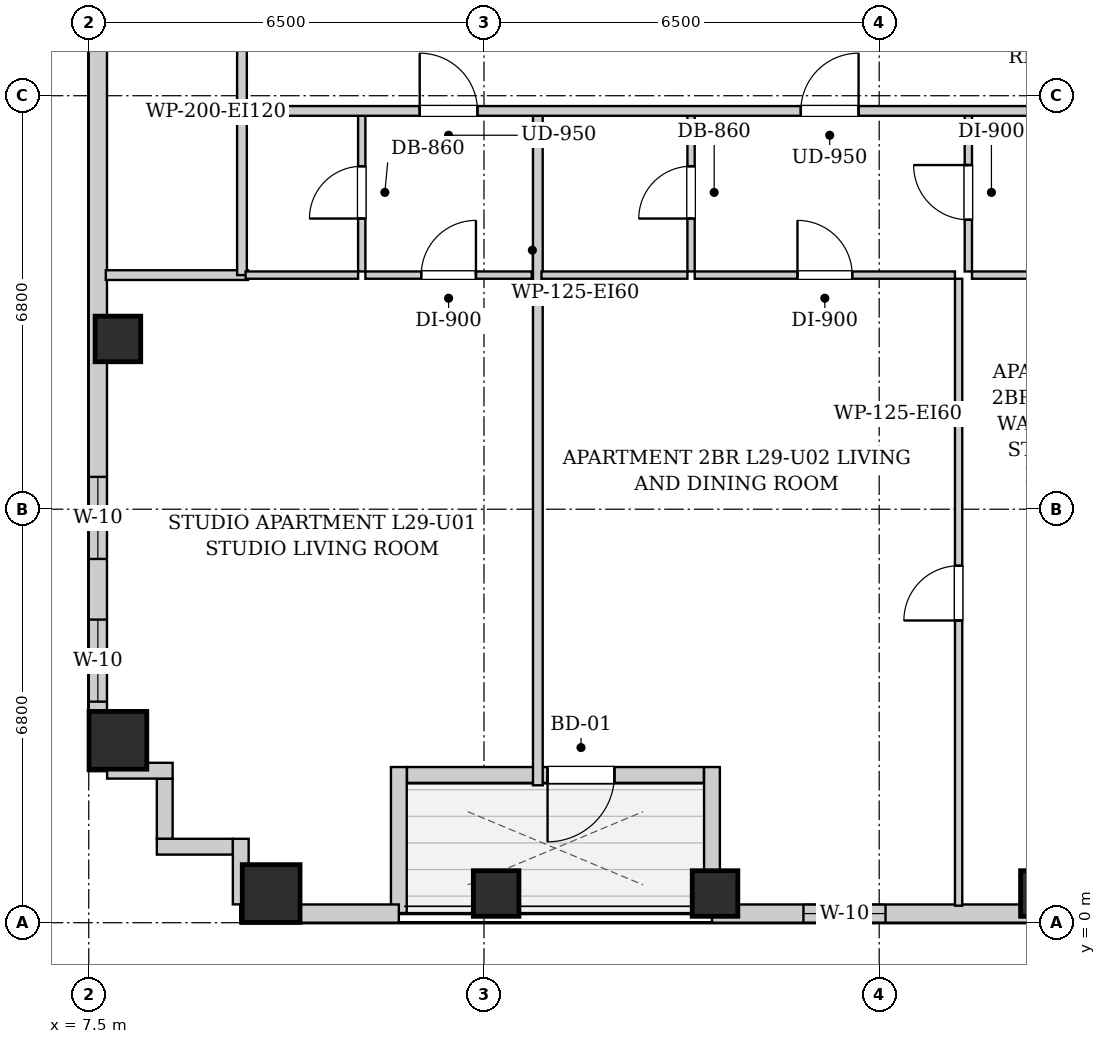
"""IFC4 building model, lengths in metres.
Left out: names, types, materials, properties, quantities, classifications, styles, units other than length and angle.
Written with IfcOpenShell. Run it as: python <this file> out.ifc"""

import sys

from ifc_helpers import new_model, si_unit, direction, frame, frame_2d, origin, origin_2d, place, context, subcontext, project, spatial, rectangle, extrude, element, fill, save


model = new_model("IFC4")
c1 = context("Model", 3, precision=1e-05, world=origin(), true_north=direction((0.0, 1.0)))
c2 = subcontext(c1, "Body", "Model", "MODEL_VIEW")
j1 = project(units=[si_unit("LENGTHUNIT", "METRE"), si_unit("PLANEANGLEUNIT", "RADIAN")], contexts=[c1])
p1 = place(None, origin())
s1 = spatial("IfcSite", under=j1, at=p1, CompositionType="ELEMENT")
p2 = place(p1, origin())
s2 = spatial("IfcBuilding", under=s1, at=p2, CompositionType="ELEMENT")
p3 = place(p2, frame((0.0, 0.0, 103.9)))
s3 = spatial("IfcBuildingStorey", under=s2, at=p3, CompositionType="ELEMENT", Elevation=103.9)
p4 = place(p3, frame((10.5, 0.48, 0.0), z_axis=(0.0, 0.0, 1.0), x_axis=(1.0, 0.0, 0.0)))
e1 = element("IfcColumn", 1, at=p4, inside=s3, PredefinedType="COLUMN", context=c2, shape_type="SweptSolid", body=[
    extrude(rectangle(XDim=0.95, YDim=0.95, at=origin_2d()), origin(), (0.0, 0.0, 1.0), 3.2),
])
for number, where, z_axis, x_axis in (
    (2, (14.2, 0.48, 0.0), (0.0, 0.0, 1.0), (1.0, 0.0, 0.0)),
    (3, (17.8, 0.48, 0.0), (0.0, 0.0, 1.0), (1.0, 0.0, 0.0)),
    (4, (23.2, 0.48, 0.0), (0.0, 0.0, 1.0), (1.0, 0.0, 0.0)),
):
    element("IfcColumn", number, at=place(p3, frame(where, z_axis=z_axis, x_axis=x_axis)), inside=s3, PredefinedType="COLUMN", context=c2, shape_type="SweptSolid", body=[
        extrude(rectangle(XDim=0.75, YDim=0.75, at=origin_2d()), origin(), (0.0, 0.0, 1.0), 3.2),
    ])
p5 = place(p3, frame((7.98, 3.0, 0.0), z_axis=(0.0, 0.0, 1.0), x_axis=(1.0, 0.0, 0.0)))
e5 = element("IfcColumn", 5, at=p5, inside=s3, PredefinedType="COLUMN", context=c2, shape_type="SweptSolid", body=[
    extrude(rectangle(XDim=0.95, YDim=0.95, at=origin_2d()), origin(), (0.0, 0.0, 1.0), 3.2),
])
p6 = place(p3, frame((7.98, 9.6, 0.0), z_axis=(0.0, 0.0, 1.0), x_axis=(1.0, 0.0, 0.0)))
e6 = element("IfcColumn", 6, at=p6, inside=s3, PredefinedType="COLUMN", context=c2, shape_type="SweptSolid", body=[
    extrude(rectangle(XDim=0.75, YDim=0.75, at=origin_2d()), origin(), (0.0, 0.0, 1.0), 3.2),
])
p7 = place(p3, frame((40.9, 0.15, 0.0), z_axis=(0.0, 0.0, 1.0), x_axis=(-1.0, 0.0, 0.0)))
e7 = element("IfcWall", 7, at=p7, inside=s3, PredefinedType="SOLIDWALL", context=c2, shape_type="SweptSolid", body=[
    extrude(rectangle(XDim=23.15, YDim=0.3, at=frame_2d((11.575, 0.0))), origin(), (0.0, 0.0, 1.0), 2.94),
])
p8 = place(p7, frame((20.296, 0.0, 0.55)))
e8 = element("IfcOpeningElement", 8, at=p8, cuts=e7, PredefinedType="OPENING", context=c2, shape_type="SweptSolid", body=[
    extrude(rectangle(XDim=1.35, YDim=1.2, at=frame_2d((0.675, 0.6))), frame((0.0, 0.16, 0.0), z_axis=(0.0, -1.0, 0.0), x_axis=(1.0, 0.0, 0.0)), (0.0, 0.0, 1.0), 0.32),
])
p9 = place(p7, frame((12.55, 0.0, 0.55)))
e9 = element("IfcOpeningElement", 9, at=p9, cuts=e7, PredefinedType="OPENING", context=c2, shape_type="SweptSolid", body=[
    extrude(rectangle(XDim=0.85, YDim=1.2, at=frame_2d((0.425, 0.6))), frame((0.0, 0.16, 0.0), z_axis=(0.0, -1.0, 0.0), x_axis=(1.0, 0.0, 0.0)), (0.0, 0.0, 1.0), 0.32),
])
p10 = place(p7, frame((9.622, 0.0, 0.55)))
e10 = element("IfcOpeningElement", 10, at=p10, cuts=e7, PredefinedType="OPENING", context=c2, shape_type="SweptSolid", body=[
    extrude(rectangle(XDim=1.35, YDim=1.2, at=frame_2d((0.675, 0.6))), frame((0.0, 0.16, 0.0), z_axis=(0.0, -1.0, 0.0), x_axis=(1.0, 0.0, 0.0)), (0.0, 0.0, 1.0), 0.32),
])
p11 = place(p7, frame((5.815, 0.0, 0.55)))
e11 = element("IfcOpeningElement", 11, at=p11, cuts=e7, PredefinedType="OPENING", context=c2, shape_type="SweptSolid", body=[
    extrude(rectangle(XDim=1.35, YDim=1.2, at=frame_2d((0.675, 0.6))), frame((0.0, 0.16, 0.0), z_axis=(0.0, -1.0, 0.0), x_axis=(1.0, 0.0, 0.0)), (0.0, 0.0, 1.0), 0.32),
])
p12 = place(p7, frame((2.106, 0.0, 0.55)))
e12 = element("IfcOpeningElement", 12, at=p12, cuts=e7, PredefinedType="OPENING", context=c2, shape_type="SweptSolid", body=[
    extrude(rectangle(XDim=1.35, YDim=1.2, at=frame_2d((0.675, 0.6))), frame((0.0, 0.16, 0.0), z_axis=(0.0, -1.0, 0.0), x_axis=(1.0, 0.0, 0.0)), (0.0, 0.0, 1.0), 0.32),
])
p13 = place(p3, frame((17.75, 0.16, 0.0), z_axis=(0.0, 0.0, 1.0), x_axis=(0.0, 1.0, 0.0)))
e13 = element("IfcWall", 13, at=p13, inside=s3, PredefinedType="SOLIDWALL", context=c2, shape_type="SweptSolid", body=[
    extrude(rectangle(XDim=2.4, YDim=0.26, at=frame_2d((1.2, 0.0))), origin(), (0.0, 0.0, 1.0), 2.313),
])
p14 = place(p3, frame((17.616, 2.43, 0.0), z_axis=(0.0, 0.0, 1.0), x_axis=(-1.0, 0.0, 0.0)))
e14 = element("IfcWall", 14, at=p14, inside=s3, PredefinedType="SOLIDWALL", context=c2, shape_type="SweptSolid", body=[
    extrude(rectangle(XDim=4.882, YDim=0.26, at=frame_2d((2.441, 0.0))), origin(), (0.0, 0.0, 1.0), 2.94),
])
p15 = place(p14, frame((1.47, 0.0, 0.0)))
e15 = element("IfcOpeningElement", 15, at=p15, cuts=e14, PredefinedType="OPENING", context=c2, shape_type="SweptSolid", body=[
    extrude(rectangle(XDim=1.1, YDim=2.0, at=frame_2d((0.55, 1.0))), frame((0.0, 0.14, 0.0), z_axis=(0.0, -1.0, 0.0), x_axis=(1.0, 0.0, 0.0)), (0.0, 0.0, 1.0), 0.28),
])
p16 = place(p3, frame((12.6, 2.56, 0.0), z_axis=(0.0, 0.0, 1.0), x_axis=(0.0, -1.0, 0.0)))
e16 = element("IfcWall", 16, at=p16, inside=s3, PredefinedType="SOLIDWALL", context=c2, shape_type="SweptSolid", body=[
    extrude(rectangle(XDim=2.4, YDim=0.26, at=frame_2d((1.2, 0.0))), origin(), (0.0, 0.0, 1.0), 2.94),
])
p17 = place(p3, frame((12.6, 0.15, 0.0), z_axis=(0.0, 0.0, 1.0), x_axis=(-1.0, 0.0, 0.0)))
e17 = element("IfcWall", 17, at=p17, inside=s3, PredefinedType="SOLIDWALL", context=c2, shape_type="SweptSolid", body=[
    extrude(rectangle(XDim=2.6, YDim=0.3, at=frame_2d((1.3, 0.0))), origin(), (0.0, 0.0, 1.0), 2.94),
])
p18 = place(p3, frame((7.65, 2.5, 0.0), z_axis=(0.0, 0.0, 1.0), x_axis=(0.0, 1.0, 0.0)))
e18 = element("IfcWall", 18, at=p18, inside=s3, PredefinedType="SOLIDWALL", context=c2, shape_type="SweptSolid", body=[
    extrude(rectangle(XDim=12.7, YDim=0.3, at=frame_2d((6.35, 0.0))), origin(), (0.0, 0.0, 1.0), 2.94),
])
p19 = place(p18, frame((3.482, 0.0, 0.55)))
e19 = element("IfcOpeningElement", 19, at=p19, cuts=e18, PredefinedType="OPENING", context=c2, shape_type="SweptSolid", body=[
    extrude(rectangle(XDim=1.35, YDim=1.2, at=frame_2d((0.675, 0.6))), frame((0.0, 0.16, 0.0), z_axis=(0.0, -1.0, 0.0), x_axis=(1.0, 0.0, 0.0)), (0.0, 0.0, 1.0), 0.32),
])
p20 = place(p18, frame((1.135, 0.0, 0.55)))
e20 = element("IfcOpeningElement", 20, at=p20, cuts=e18, PredefinedType="OPENING", context=c2, shape_type="SweptSolid", body=[
    extrude(rectangle(XDim=1.35, YDim=1.2, at=frame_2d((0.675, 0.6))), frame((0.0, 0.16, 0.0), z_axis=(0.0, -1.0, 0.0), x_axis=(1.0, 0.0, 0.0)), (0.0, 0.0, 1.0), 0.32),
])
p21 = place(p3, frame((10.0, 0.302, 0.0), z_axis=(0.0, 0.0, 1.0), x_axis=(0.0, 1.0, 0.0)))
e21 = element("IfcWall", 21, at=p21, inside=s3, PredefinedType="SOLIDWALL", context=c2, shape_type="SweptSolid", body=[
    extrude(rectangle(XDim=1.078, YDim=0.26, at=frame_2d((0.539, 0.0))), origin(), (0.0, 0.0, 1.0), 2.94),
])
p22 = place(p3, frame((9.868, 1.25, 0.0), z_axis=(0.0, 0.0, 1.0), x_axis=(-1.0, 0.0, 0.0)))
e22 = element("IfcWall", 22, at=p22, inside=s3, PredefinedType="SOLIDWALL", context=c2, shape_type="SweptSolid", body=[
    extrude(rectangle(XDim=1.248, YDim=0.26, at=frame_2d((0.624, 0.0))), origin(), (0.0, 0.0, 1.0), 2.94),
])
p23 = place(p3, frame((8.75, 1.382, 0.0), z_axis=(0.0, 0.0, 1.0), x_axis=(0.0, 1.0, 0.0)))
e23 = element("IfcWall", 23, at=p23, inside=s3, PredefinedType="SOLIDWALL", context=c2, shape_type="SweptSolid", body=[
    extrude(rectangle(XDim=0.986, YDim=0.26, at=frame_2d((0.493, 0.0))), origin(), (0.0, 0.0, 1.0), 2.94),
])
p24 = place(p3, frame((8.88, 2.5, 0.0), z_axis=(0.0, 0.0, 1.0), x_axis=(-1.0, 0.0, 0.0)))
e24 = element("IfcWall", 24, at=p24, inside=s3, PredefinedType="SOLIDWALL", context=c2, shape_type="SweptSolid", body=[
    extrude(rectangle(XDim=1.078, YDim=0.26, at=frame_2d((0.539, 0.0))), origin(), (0.0, 0.0, 1.0), 2.94),
])
p25 = place(p3, frame((10.02, 13.35, 0.0), z_axis=(0.0, 0.0, 1.0), x_axis=(0.0, 1.0, 0.0)))
e25 = element("IfcWall", 25, at=p25, inside=s3, PredefinedType="PARTITIONING", context=c2, shape_type="SweptSolid", body=[
    extrude(rectangle(XDim=1.74, YDim=0.16, at=frame_2d((0.87, 0.0))), origin(), (0.0, 0.0, 1.0), 2.94),
])
p26 = place(p3, frame((7.78, 10.65, 0.0), z_axis=(0.0, 0.0, 1.0), x_axis=(1.0, 0.0, 0.0)))
e26 = element("IfcWall", 26, at=p26, inside=s3, PredefinedType="PARTITIONING", context=c2, shape_type="SweptSolid", body=[
    extrude(rectangle(XDim=2.34, YDim=0.16, at=frame_2d((1.17, 0.0))), origin(), (0.0, 0.0, 1.0), 2.94),
])
p27 = place(p3, frame((10.02, 10.65, 0.0), z_axis=(0.0, 0.0, 1.0), x_axis=(0.0, 1.0, 0.0)))
e27 = element("IfcWall", 27, at=p27, inside=s3, PredefinedType="PARTITIONING", context=c2, shape_type="SweptSolid", body=[
    extrude(rectangle(XDim=2.66, YDim=0.16, at=frame_2d((1.33, 0.0))), origin(), (0.0, 0.0, 1.0), 2.94),
])
p28 = place(p3, frame((11.99, 10.71, 0.0), z_axis=(0.0, 0.0, 1.0), x_axis=(0.0, 1.0, 0.0)))
e28 = element("IfcWall", 28, at=p28, inside=s3, PredefinedType="PARTITIONING", context=c2, shape_type="SweptSolid", body=[
    extrude(rectangle(XDim=2.6, YDim=0.12, at=frame_2d((1.3, 0.0))), origin(), (0.0, 0.0, 1.0), 2.94),
])
p29 = place(p28, frame((0.87, 0.0, 0.0)))
e29 = element("IfcOpeningElement", 29, at=p29, cuts=e28, PredefinedType="OPENING", context=c2, shape_type="SweptSolid", body=[
    extrude(rectangle(XDim=0.86, YDim=2.05, at=frame_2d((0.43, 1.025))), frame((0.0, 0.07, 0.0), z_axis=(0.0, -1.0, 0.0), x_axis=(1.0, 0.0, 0.0)), (0.0, 0.0, 1.0), 0.14),
])
p30 = place(p3, frame((10.08, 10.65, 0.0), z_axis=(0.0, 0.0, 1.0), x_axis=(1.0, 0.0, 0.0)))
e30 = element("IfcWall", 30, at=p30, inside=s3, PredefinedType="PARTITIONING", context=c2, shape_type="SweptSolid", body=[
    extrude(rectangle(XDim=1.85, YDim=0.12, at=frame_2d((0.925, 0.0))), origin(), (0.0, 0.0, 1.0), 2.94),
])
p31 = place(p3, frame((12.05, 10.65, 0.0), z_axis=(0.0, 0.0, 1.0), x_axis=(1.0, 0.0, 0.0)))
e31 = element("IfcWall", 31, at=p31, inside=s3, PredefinedType="PARTITIONING", context=c2, shape_type="SweptSolid", body=[
    extrude(rectangle(XDim=2.736, YDim=0.12, at=frame_2d((1.368, 0.0))), origin(), (0.0, 0.0, 1.0), 2.94),
])
p32 = place(p31, frame((0.918, 0.0, 0.0)))
e32 = element("IfcOpeningElement", 32, at=p32, cuts=e31, PredefinedType="OPENING", context=c2, shape_type="SweptSolid", body=[
    extrude(rectangle(XDim=0.9, YDim=2.05, at=frame_2d((0.45, 1.025))), frame((0.0, 0.07, 0.0), z_axis=(0.0, -1.0, 0.0), x_axis=(1.0, 0.0, 0.0)), (0.0, 0.0, 1.0), 0.14),
])
p33 = place(p3, frame((14.886, 2.26, 0.0), z_axis=(0.0, 0.0, 1.0), x_axis=(0.0, 1.0, 0.0)))
e33 = element("IfcWall", 33, at=p33, inside=s3, PredefinedType="PARTITIONING", context=c2, shape_type="SweptSolid", body=[
    extrude(rectangle(XDim=11.05, YDim=0.16, at=frame_2d((5.525, 0.0))), origin(), (0.0, 0.0, 1.0), 2.94),
])
p34 = place(p3, frame((17.406, 10.71, 0.0), z_axis=(0.0, 0.0, 1.0), x_axis=(0.0, 1.0, 0.0)))
e34 = element("IfcWall", 34, at=p34, inside=s3, PredefinedType="PARTITIONING", context=c2, shape_type="SweptSolid", body=[
    extrude(rectangle(XDim=2.6, YDim=0.12, at=frame_2d((1.3, 0.0))), origin(), (0.0, 0.0, 1.0), 2.94),
])
p35 = place(p34, frame((0.87, 0.0, 0.0)))
e35 = element("IfcOpeningElement", 35, at=p35, cuts=e34, PredefinedType="OPENING", context=c2, shape_type="SweptSolid", body=[
    extrude(rectangle(XDim=0.86, YDim=2.05, at=frame_2d((0.43, 1.025))), frame((0.0, 0.07, 0.0), z_axis=(0.0, -1.0, 0.0), x_axis=(1.0, 0.0, 0.0)), (0.0, 0.0, 1.0), 0.14),
])
p36 = place(p3, frame((14.946, 10.65, 0.0), z_axis=(0.0, 0.0, 1.0), x_axis=(1.0, 0.0, 0.0)))
e36 = element("IfcWall", 36, at=p36, inside=s3, PredefinedType="PARTITIONING", context=c2, shape_type="SweptSolid", body=[
    extrude(rectangle(XDim=2.4, YDim=0.12, at=frame_2d((1.2, 0.0))), origin(), (0.0, 0.0, 1.0), 2.94),
])
p37 = place(p3, frame((21.966, 10.71, 0.0), z_axis=(0.0, 0.0, 1.0), x_axis=(0.0, 1.0, 0.0)))
e37 = element("IfcWall", 37, at=p37, inside=s3, PredefinedType="PARTITIONING", context=c2, shape_type="SweptSolid", body=[
    extrude(rectangle(XDim=2.6, YDim=0.12, at=frame_2d((1.3, 0.0))), origin(), (0.0, 0.0, 1.0), 2.94),
])
p38 = place(p37, frame((0.85, 0.0, 0.0)))
e38 = element("IfcOpeningElement", 38, at=p38, cuts=e37, PredefinedType="OPENING", context=c2, shape_type="SweptSolid", body=[
    extrude(rectangle(XDim=0.9, YDim=2.05, at=frame_2d((0.45, 1.025))), frame((0.0, 0.07, 0.0), z_axis=(0.0, -1.0, 0.0), x_axis=(1.0, 0.0, 0.0)), (0.0, 0.0, 1.0), 0.14),
])
p39 = place(p3, frame((17.466, 10.65, 0.0), z_axis=(0.0, 0.0, 1.0), x_axis=(1.0, 0.0, 0.0)))
e39 = element("IfcWall", 39, at=p39, inside=s3, PredefinedType="PARTITIONING", context=c2, shape_type="SweptSolid", body=[
    extrude(rectangle(XDim=4.28, YDim=0.12, at=frame_2d((2.14, 0.0))), origin(), (0.0, 0.0, 1.0), 2.94),
])
p40 = place(p39, frame((1.69, 0.0, 0.0)))
e40 = element("IfcOpeningElement", 40, at=p40, cuts=e39, PredefinedType="OPENING", context=c2, shape_type="SweptSolid", body=[
    extrude(rectangle(XDim=0.9, YDim=2.05, at=frame_2d((0.45, 1.025))), frame((0.0, 0.07, 0.0), z_axis=(0.0, -1.0, 0.0), x_axis=(1.0, 0.0, 0.0)), (0.0, 0.0, 1.0), 0.14),
])
p41 = place(p3, frame((22.026, 10.65, 0.0), z_axis=(0.0, 0.0, 1.0), x_axis=(1.0, 0.0, 0.0)))
e41 = element("IfcWall", 41, at=p41, inside=s3, PredefinedType="PARTITIONING", context=c2, shape_type="SweptSolid", body=[
    extrude(rectangle(XDim=2.905, YDim=0.12, at=frame_2d((1.453, 0.0))), origin(), (0.0, 0.0, 1.0), 2.94),
])
p42 = place(p41, frame((1.003, 0.0, 0.0)))
e42 = element("IfcOpeningElement", 42, at=p42, cuts=e41, PredefinedType="OPENING", context=c2, shape_type="SweptSolid", body=[
    extrude(rectangle(XDim=0.9, YDim=2.05, at=frame_2d((0.45, 1.025))), frame((0.0, 0.07, 0.0), z_axis=(0.0, -1.0, 0.0), x_axis=(1.0, 0.0, 0.0)), (0.0, 0.0, 1.0), 0.14),
])
p43 = place(p3, frame((21.806, 0.28, 0.0), z_axis=(0.0, 0.0, 1.0), x_axis=(0.0, 1.0, 0.0)))
e43 = element("IfcWall", 43, at=p43, inside=s3, PredefinedType="PARTITIONING", context=c2, shape_type="SweptSolid", body=[
    extrude(rectangle(XDim=10.31, YDim=0.12, at=frame_2d((5.155, 0.0))), origin(), (0.0, 0.0, 1.0), 2.94),
])
p44 = place(p43, frame((4.69, 0.0, 0.0)))
e44 = element("IfcOpeningElement", 44, at=p44, cuts=e43, PredefinedType="OPENING", context=c2, shape_type="SweptSolid", body=[
    extrude(rectangle(XDim=0.9, YDim=2.05, at=frame_2d((0.45, 1.025))), frame((0.0, 0.07, 0.0), z_axis=(0.0, -1.0, 0.0), x_axis=(1.0, 0.0, 0.0)), (0.0, 0.0, 1.0), 0.14),
])
p45 = place(p3, frame((10.05, 13.35, 0.0), z_axis=(0.0, 0.0, 1.0), x_axis=(1.0, 0.0, 0.0)))
e45 = element("IfcWall", 45, at=p45, inside=s3, PredefinedType="PARTITIONING", context=c2, shape_type="SweptSolid", body=[
    extrude(rectangle(XDim=30.8, YDim=0.16, at=frame_2d((15.4, 0.0))), origin(), (0.0, 0.0, 1.0), 2.94),
])
p46 = place(p45, frame((2.893, 0.0, 0.0)))
e46 = element("IfcOpeningElement", 46, at=p46, cuts=e45, PredefinedType="OPENING", context=c2, shape_type="SweptSolid", body=[
    extrude(rectangle(XDim=0.95, YDim=2.1, at=frame_2d((0.475, 1.05))), frame((0.0, 0.09, 0.0), z_axis=(0.0, -1.0, 0.0), x_axis=(1.0, 0.0, 0.0)), (0.0, 0.0, 1.0), 0.18),
])
p47 = place(p45, frame((9.161, 0.0, 0.0)))
e47 = element("IfcOpeningElement", 47, at=p47, cuts=e45, PredefinedType="OPENING", context=c2, shape_type="SweptSolid", body=[
    extrude(rectangle(XDim=0.95, YDim=2.1, at=frame_2d((0.475, 1.05))), frame((0.0, 0.09, 0.0), z_axis=(0.0, -1.0, 0.0), x_axis=(1.0, 0.0, 0.0)), (0.0, 0.0, 1.0), 0.18),
])
p48 = place(p45, frame((26.306, 0.0, 0.0)))
e48 = element("IfcOpeningElement", 48, at=p48, cuts=e45, PredefinedType="OPENING", context=c2, shape_type="SweptSolid", body=[
    extrude(rectangle(XDim=0.95, YDim=2.1, at=frame_2d((0.475, 1.05))), frame((0.0, 0.09, 0.0), z_axis=(0.0, -1.0, 0.0), x_axis=(1.0, 0.0, 0.0)), (0.0, 0.0, 1.0), 0.18),
])
p49 = place(p29, origin())
e49 = element("IfcDoor", 49, at=p49, inside=s3, OperationType="SINGLE_SWING_LEFT", PredefinedType="DOOR", context=c2, shape_type="SweptSolid", body=[
    extrude(rectangle(XDim=0.86, YDim=2.05, at=frame_2d((0.43, 1.025))), frame((0.0, 0.025, 0.0), z_axis=(0.0, -1.0, 0.0), x_axis=(1.0, 0.0, 0.0)), (0.0, 0.0, 1.0), 0.05),
])
fill(e29, e49)
p50 = place(p32, origin())
e50 = element("IfcDoor", 50, at=p50, inside=s3, OperationType="SINGLE_SWING_RIGHT", PredefinedType="DOOR", context=c2, shape_type="SweptSolid", body=[
    extrude(rectangle(XDim=0.9, YDim=2.05, at=frame_2d((0.45, 1.025))), frame((0.0, 0.025, 0.0), z_axis=(0.0, -1.0, 0.0), x_axis=(1.0, 0.0, 0.0)), (0.0, 0.0, 1.0), 0.05),
])
fill(e32, e50)
p51 = place(p35, origin())
e51 = element("IfcDoor", 51, at=p51, inside=s3, OperationType="SINGLE_SWING_LEFT", PredefinedType="DOOR", context=c2, shape_type="SweptSolid", body=[
    extrude(rectangle(XDim=0.86, YDim=2.05, at=frame_2d((0.43, 1.025))), frame((0.0, 0.025, 0.0), z_axis=(0.0, -1.0, 0.0), x_axis=(1.0, 0.0, 0.0)), (0.0, 0.0, 1.0), 0.05),
])
fill(e35, e51)
p52 = place(p38, origin())
e52 = element("IfcDoor", 52, at=p52, inside=s3, OperationType="SINGLE_SWING_RIGHT", PredefinedType="DOOR", context=c2, shape_type="SweptSolid", body=[
    extrude(rectangle(XDim=0.9, YDim=2.05, at=frame_2d((0.45, 1.025))), frame((0.0, 0.025, 0.0), z_axis=(0.0, -1.0, 0.0), x_axis=(1.0, 0.0, 0.0)), (0.0, 0.0, 1.0), 0.05),
])
fill(e38, e52)
p53 = place(p40, origin())
e53 = element("IfcDoor", 53, at=p53, inside=s3, OperationType="SINGLE_SWING_LEFT", PredefinedType="DOOR", context=c2, shape_type="SweptSolid", body=[
    extrude(rectangle(XDim=0.9, YDim=2.05, at=frame_2d((0.45, 1.025))), frame((0.0, 0.025, 0.0), z_axis=(0.0, -1.0, 0.0), x_axis=(1.0, 0.0, 0.0)), (0.0, 0.0, 1.0), 0.05),
])
fill(e40, e53)
p54 = place(p44, origin())
e54 = element("IfcDoor", 54, at=p54, inside=s3, OperationType="SINGLE_SWING_LEFT", PredefinedType="DOOR", context=c2, shape_type="SweptSolid", body=[
    extrude(rectangle(XDim=0.9, YDim=2.05, at=frame_2d((0.45, 1.025))), frame((0.0, 0.025, 0.0), z_axis=(0.0, -1.0, 0.0), x_axis=(1.0, 0.0, 0.0)), (0.0, 0.0, 1.0), 0.05),
])
fill(e44, e54)
p55 = place(p46, origin())
e55 = element("IfcDoor", 55, at=p55, inside=s3, OperationType="SINGLE_SWING_LEFT", PredefinedType="DOOR", context=c2, shape_type="SweptSolid", body=[
    extrude(rectangle(XDim=0.95, YDim=2.1, at=frame_2d((0.475, 1.05))), frame((0.0, 0.025, 0.0), z_axis=(0.0, -1.0, 0.0), x_axis=(1.0, 0.0, 0.0)), (0.0, 0.0, 1.0), 0.05),
])
fill(e46, e55)
p56 = place(p47, origin())
e56 = element("IfcDoor", 56, at=p56, inside=s3, OperationType="SINGLE_SWING_RIGHT", PredefinedType="DOOR", context=c2, shape_type="SweptSolid", body=[
    extrude(rectangle(XDim=0.95, YDim=2.1, at=frame_2d((0.475, 1.05))), frame((0.0, 0.025, 0.0), z_axis=(0.0, -1.0, 0.0), x_axis=(1.0, 0.0, 0.0)), (0.0, 0.0, 1.0), 0.05),
])
fill(e47, e56)
p57 = place(p15, origin())
e57 = element("IfcDoor", 57, at=p57, inside=s3, OperationType="SINGLE_SWING_RIGHT", PredefinedType="DOOR", context=c2, shape_type="SweptSolid", body=[
    extrude(rectangle(XDim=1.1, YDim=2.0, at=frame_2d((0.55, 1.0))), frame((0.0, 0.025, 0.0), z_axis=(0.0, -1.0, 0.0), x_axis=(1.0, 0.0, 0.0)), (0.0, 0.0, 1.0), 0.05),
])
fill(e15, e57)
p58 = place(p19, origin())
e58 = element("IfcWindow", 58, at=p58, inside=s3, PartitioningType="SINGLE_PANEL", PredefinedType="WINDOW", context=c2, shape_type="SweptSolid", body=[
    extrude(rectangle(XDim=1.35, YDim=1.2, at=frame_2d((0.675, 0.6))), frame((0.0, 0.03, 0.0), z_axis=(0.0, -1.0, 0.0), x_axis=(1.0, 0.0, 0.0)), (0.0, 0.0, 1.0), 0.06),
])
fill(e19, e58)
p59 = place(p20, origin())
e59 = element("IfcWindow", 59, at=p59, inside=s3, PartitioningType="SINGLE_PANEL", PredefinedType="WINDOW", context=c2, shape_type="SweptSolid", body=[
    extrude(rectangle(XDim=1.35, YDim=1.2, at=frame_2d((0.675, 0.6))), frame((0.0, 0.03, 0.0), z_axis=(0.0, -1.0, 0.0), x_axis=(1.0, 0.0, 0.0)), (0.0, 0.0, 1.0), 0.06),
])
fill(e20, e59)
p60 = place(p8, origin())
e60 = element("IfcWindow", 60, at=p60, inside=s3, PartitioningType="SINGLE_PANEL", PredefinedType="WINDOW", context=c2, shape_type="SweptSolid", body=[
    extrude(rectangle(XDim=1.35, YDim=1.2, at=frame_2d((0.675, 0.6))), frame((0.0, 0.03, 0.0), z_axis=(0.0, -1.0, 0.0), x_axis=(1.0, 0.0, 0.0)), (0.0, 0.0, 1.0), 0.06),
])
fill(e8, e60)
save(model, sys.argv[1])
